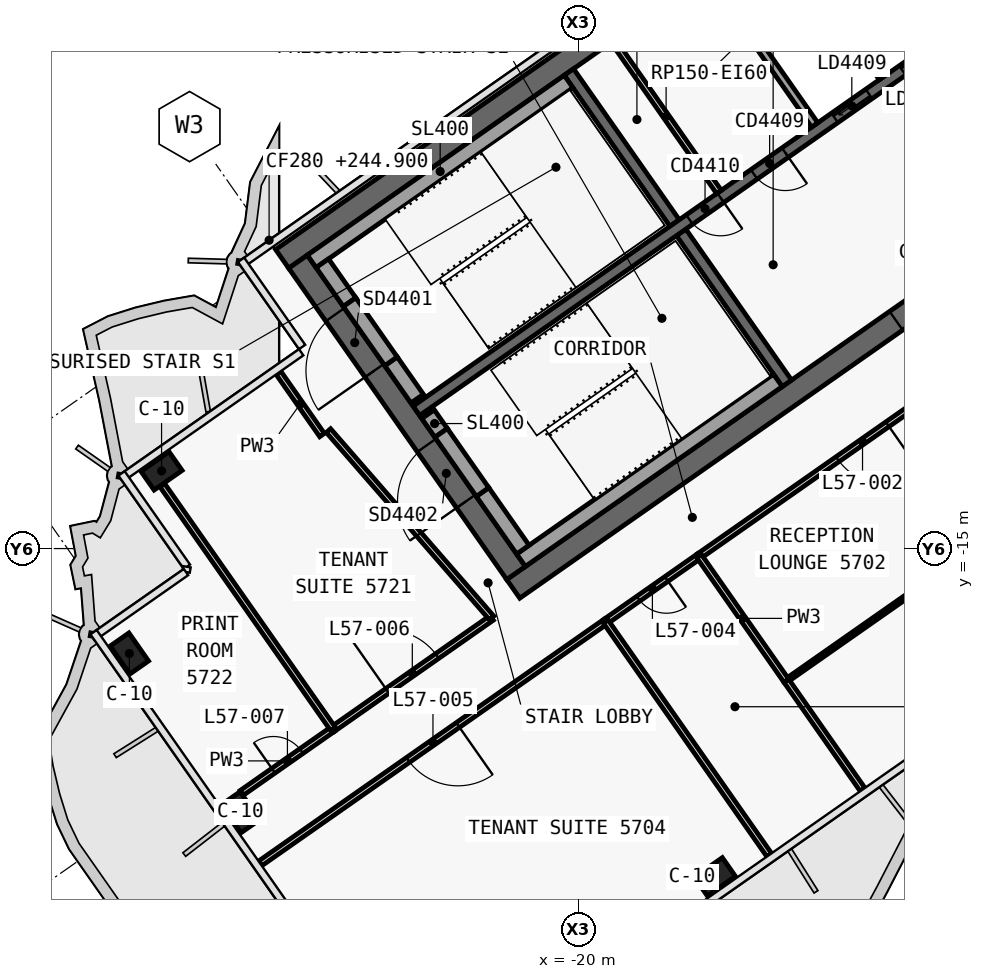
"""IFC4 building model, lengths in metres.
Left out: names, types, materials, properties, quantities, classifications, styles, units other than length and angle.
Written with IfcOpenShell. Run it as: python <this file> out.ifc"""

import sys

from ifc_helpers import new_model, si_unit, direction, frame, frame_2d, origin, origin_2d, place, context, subcontext, project, spatial, polyline, rectangle, outline, extrude, element, fill, save


model = new_model("IFC4")
c1 = context("Model", 3, precision=1e-05, world=origin(), true_north=direction((0.0, 1.0)))
c2 = subcontext(c1, "Body", "Model", "MODEL_VIEW")
j1 = project(units=[si_unit("LENGTHUNIT", "METRE"), si_unit("PLANEANGLEUNIT", "RADIAN")], contexts=[c1])
p1 = place(None, origin())
s1 = spatial("IfcSite", under=j1, at=p1, CompositionType="ELEMENT")
p2 = place(p1, origin())
s2 = spatial("IfcBuilding", under=s1, at=p2, CompositionType="ELEMENT")
p3 = place(p2, frame((0.0, 0.0, 244.9)))
s3 = spatial("IfcBuildingStorey", under=s2, at=p3, CompositionType="ELEMENT", Elevation=244.9)
p4 = place(p3, frame((-0.028, 12.066, 0.0), z_axis=(0.0, 0.0, 1.0), x_axis=(-0.819151382952, -0.573577380837, 0.0)))
e1 = element("IfcWall", 1, at=p4, inside=s3, PredefinedType="SHEAR", context=c2, shape_type="SweptSolid", body=[
    extrude(outline(polyline([(33.898, 0.3), (0.42, 0.3), (0.0, -0.3), (33.898, -0.3), (33.898, 0.3)])), origin(), (0.0, 0.0, 1.0), 3.9),
])
p5 = place(p3, frame((-0.028, -0.874, 0.0), z_axis=(0.0, 0.0, 1.0), x_axis=(-0.819150035022, -0.573579305871, 0.0)))
e2 = element("IfcWall", 2, at=p5, inside=s3, PredefinedType="SHEAR", context=c2, shape_type="SweptSolid", body=[
    extrude(outline(polyline([(26.476, 0.3), (0.42, 0.3), (0.0, -0.3), (26.476, -0.3), (26.476, 0.3)])), origin(), (0.0, 0.0, 1.0), 3.9),
])
p6 = place(p5, frame((2.976, 0.0, 0.0)))
e3 = element("IfcOpeningElement", 3, at=p6, cuts=e2, PredefinedType="OPENING", context=c2, shape_type="SweptSolid", body=[
    extrude(rectangle(XDim=2.4, YDim=2.1, at=frame_2d((1.2, 1.05))), frame((0.0, 0.31, 0.0), z_axis=(0.0, -1.0, 0.0), x_axis=(1.0, 0.0, 0.0)), (0.0, 0.0, 1.0), 0.62),
])
p7 = place(p5, frame((11.776, 0.0, 0.0)))
e4 = element("IfcOpeningElement", 4, at=p7, cuts=e2, PredefinedType="OPENING", context=c2, shape_type="SweptSolid", body=[
    extrude(rectangle(XDim=2.4, YDim=2.1, at=frame_2d((1.2, 1.05))), frame((0.0, 0.31, 0.0), z_axis=(0.0, -1.0, 0.0), x_axis=(1.0, 0.0, 0.0)), (0.0, 0.0, 1.0), 0.62),
])
p8 = place(p3, frame((-21.642, -15.642, 0.0), z_axis=(0.0, 0.0, 1.0), x_axis=(-0.573586866468, 0.819144740944, 0.0)))
e5 = element("IfcWall", 5, at=p8, inside=s3, PredefinedType="SHEAR", context=c2, shape_type="SweptSolid", body=[
    extrude(outline(polyline([(0.0, 0.3), (0.0, -0.3), (10.0, -0.3), (10.0, 0.3), (0.0, 0.3)])), origin(), (0.0, 0.0, 1.0), 3.9),
])
p9 = place(p8, frame((6.5, 0.0, 0.0)))
e6 = element("IfcOpeningElement", 6, at=p9, cuts=e5, PredefinedType="OPENING", context=c2, shape_type="SweptSolid", body=[
    extrude(rectangle(XDim=1.8, YDim=2.1, at=frame_2d((0.9, 1.05))), frame((0.0, 0.31, 0.0), z_axis=(0.0, -1.0, 0.0), x_axis=(1.0, 0.0, 0.0)), (0.0, 0.0, 1.0), 0.62),
])
p10 = place(p8, frame((2.3, 0.0, 0.0)))
e7 = element("IfcOpeningElement", 7, at=p10, cuts=e5, PredefinedType="OPENING", context=c2, shape_type="SweptSolid", body=[
    extrude(rectangle(XDim=1.8, YDim=2.1, at=frame_2d((0.9, 1.05))), frame((0.0, 0.31, 0.0), z_axis=(0.0, -1.0, 0.0), x_axis=(1.0, 0.0, 0.0)), (0.0, 0.0, 1.0), 0.62),
])
p11 = place(p3, frame((-14.515, -10.652, 0.0), z_axis=(0.0, 0.0, 1.0), x_axis=(-0.573560315113, 0.819163332265, 0.0)))
e8 = element("IfcWall", 8, at=p11, inside=s3, PredefinedType="SHEAR", context=c2, shape_type="SweptSolid", body=[
    extrude(outline(polyline([(4.85, 0.15), (0.0, 0.15), (0.0, -0.15), (4.85, -0.15), (4.85, 0.15)])), origin(), (0.0, 0.0, 1.0), 3.9),
])
p12 = place(p3, frame((-17.469, -6.433, 0.0), z_axis=(0.0, 0.0, 1.0), x_axis=(-0.573594092424, 0.81913968109, 0.0)))
e9 = element("IfcWall", 9, at=p12, inside=s3, PredefinedType="SHEAR", context=c2, shape_type="SweptSolid", body=[
    extrude(outline(polyline([(4.85, -0.15), (4.85, 0.15), (0.0, 0.15), (0.0, -0.15), (4.85, -0.15)])), origin(), (0.0, 0.0, 1.0), 3.9),
])
p13 = place(p3, frame((-2.638, 3.768, 0.0), z_axis=(0.0, 0.0, 1.0), x_axis=(-0.819155014212, -0.573572194837, 0.0)))
e10 = element("IfcWall", 10, at=p13, inside=s3, PredefinedType="SHEAR", context=c2, shape_type="SweptSolid", body=[
    extrude(outline(polyline([(26.4, 0.15), (0.0, 0.15), (0.0, -0.15), (26.4, -0.15), (26.4, 0.15)])), origin(), (0.0, 0.0, 1.0), 3.9),
])
p14 = place(p13, frame((1.169, 0.0, 0.0)))
e11 = element("IfcOpeningElement", 11, at=p14, cuts=e10, PredefinedType="OPENING", context=c2, shape_type="SweptSolid", body=[
    extrude(rectangle(XDim=1.1, YDim=2.1, at=frame_2d((0.55, 1.05))), frame((0.0, 0.16, 0.0), z_axis=(0.0, -1.0, 0.0), x_axis=(1.0, 0.0, 0.0)), (0.0, 0.0, 1.0), 0.32),
])
p15 = place(p13, frame((3.206, 0.0, 0.0)))
e12 = element("IfcOpeningElement", 12, at=p15, cuts=e10, PredefinedType="OPENING", context=c2, shape_type="SweptSolid", body=[
    extrude(rectangle(XDim=1.1, YDim=2.1, at=frame_2d((0.55, 1.05))), frame((0.0, 0.16, 0.0), z_axis=(0.0, -1.0, 0.0), x_axis=(1.0, 0.0, 0.0)), (0.0, 0.0, 1.0), 0.32),
])
p16 = place(p13, frame((5.244, 0.0, 0.0)))
e13 = element("IfcOpeningElement", 13, at=p16, cuts=e10, PredefinedType="OPENING", context=c2, shape_type="SweptSolid", body=[
    extrude(rectangle(XDim=1.1, YDim=2.1, at=frame_2d((0.55, 1.05))), frame((0.0, 0.16, 0.0), z_axis=(0.0, -1.0, 0.0), x_axis=(1.0, 0.0, 0.0)), (0.0, 0.0, 1.0), 0.32),
])
p17 = place(p13, frame((7.281, 0.0, 0.0)))
e14 = element("IfcOpeningElement", 14, at=p17, cuts=e10, PredefinedType="OPENING", context=c2, shape_type="SweptSolid", body=[
    extrude(rectangle(XDim=1.1, YDim=2.1, at=frame_2d((0.55, 1.05))), frame((0.0, 0.16, 0.0), z_axis=(0.0, -1.0, 0.0), x_axis=(1.0, 0.0, 0.0)), (0.0, 0.0, 1.0), 0.32),
])
p18 = place(p13, frame((9.688, 0.0, 0.0)))
e15 = element("IfcOpeningElement", 15, at=p18, cuts=e10, PredefinedType="OPENING", context=c2, shape_type="SweptSolid", body=[
    extrude(rectangle(XDim=1.1, YDim=2.1, at=frame_2d((0.55, 1.05))), frame((0.0, 0.16, 0.0), z_axis=(0.0, -1.0, 0.0), x_axis=(1.0, 0.0, 0.0)), (0.0, 0.0, 1.0), 0.32),
])
p19 = place(p13, frame((11.863, 0.0, 0.0)))
e16 = element("IfcOpeningElement", 16, at=p19, cuts=e10, PredefinedType="OPENING", context=c2, shape_type="SweptSolid", body=[
    extrude(rectangle(XDim=1.1, YDim=2.1, at=frame_2d((0.55, 1.05))), frame((0.0, 0.16, 0.0), z_axis=(0.0, -1.0, 0.0), x_axis=(1.0, 0.0, 0.0)), (0.0, 0.0, 1.0), 0.32),
])
p20 = place(p13, frame((14.552, 0.0, 0.0)))
e17 = element("IfcOpeningElement", 17, at=p20, cuts=e10, PredefinedType="OPENING", context=c2, shape_type="SweptSolid", body=[
    extrude(rectangle(XDim=1.0, YDim=2.1, at=frame_2d((0.5, 1.05))), frame((0.0, 0.16, 0.0), z_axis=(0.0, -1.0, 0.0), x_axis=(1.0, 0.0, 0.0)), (0.0, 0.0, 1.0), 0.32),
])
p21 = place(p13, frame((16.627, 0.0, 0.0)))
e18 = element("IfcOpeningElement", 18, at=p21, cuts=e10, PredefinedType="OPENING", context=c2, shape_type="SweptSolid", body=[
    extrude(rectangle(XDim=1.0, YDim=2.1, at=frame_2d((0.5, 1.05))), frame((0.0, 0.16, 0.0), z_axis=(0.0, -1.0, 0.0), x_axis=(1.0, 0.0, 0.0)), (0.0, 0.0, 1.0), 0.32),
])
for number, where, z_axis, x_axis in (
    (19, (-16.41, -23.637, 0.0), (0.0, 0.0, 1.0), (-0.819, -0.574, 0.0)),
    (20, (-30.969, -12.956, 0.0), (0.0, 0.0, 1.0), (-0.819, -0.574, 0.0)),
    (21, (-28.891, -21.939, 0.0), (0.0, 0.0, 1.0), (-0.574, 0.819, 0.0)),
    (22, (-31.816, -17.761, 0.0), (0.0, 0.0, 1.0), (-0.574, 0.819, 0.0)),
):
    element("IfcColumn", number, at=place(p3, frame(where, z_axis=z_axis, x_axis=x_axis)), inside=s3, PredefinedType="COLUMN", context=c2, shape_type="SweptSolid", body=[
        extrude(rectangle(XDim=0.9, YDim=0.6, at=origin_2d()), origin(), (0.0, 0.0, 1.0), 3.9),
    ])
p22 = place(p3, frame((-16.302, -5.616, 0.0), z_axis=(0.0, 0.0, 1.0), x_axis=(-0.573560315113, 0.819163332265, 0.0)))
e23 = element("IfcWall", 23, at=p22, inside=s3, PredefinedType="PARTITIONING", context=c2, shape_type="SweptSolid", body=[
    extrude(rectangle(XDim=4.85, YDim=0.15, at=frame_2d((2.425, 0.0))), origin(), (0.0, 0.0, 1.0), 3.62),
])
p23 = place(p3, frame((-12.001, -2.605, 0.0), z_axis=(0.0, 0.0, 1.0), x_axis=(-0.573560315113, 0.819163332265, 0.0)))
e24 = element("IfcWall", 24, at=p23, inside=s3, PredefinedType="SOLIDWALL", context=c2, shape_type="SweptSolid", body=[
    extrude(rectangle(XDim=4.85, YDim=0.2, at=frame_2d((2.425, 0.0))), origin(), (0.0, 0.0, 1.0), 3.9),
])
p24 = place(p3, frame((-13.783, -3.852, 0.0), z_axis=(0.0, 0.0, 1.0), x_axis=(-0.573594092424, 0.81913968109, 0.0)))
e25 = element("IfcWall", 25, at=p24, inside=s3, PredefinedType="SOLIDWALL", context=c2, shape_type="SweptSolid", body=[
    extrude(rectangle(XDim=4.85, YDim=0.2, at=frame_2d((2.425, 0.0))), origin(), (0.0, 0.0, 1.0), 3.9),
])
p25 = place(p3, frame((-20.259, -2.71, 0.0), z_axis=(0.0, 0.0, 1.0), x_axis=(-0.81914849389, -0.573581506813, 0.0)))
e26 = element("IfcWall", 26, at=p25, inside=s3, PredefinedType="SOLIDWALL", context=c2, shape_type="SweptSolid", body=[
    extrude(rectangle(XDim=8.25, YDim=0.4, at=frame_2d((4.125, 0.0))), origin(), (0.0, 0.0, 1.0), 3.62),
])
p26 = place(p3, frame((-24.244, -11.055, 0.0), z_axis=(0.0, 0.0, 1.0), x_axis=(-0.573571582932, 0.819155442668, 0.0)))
e27 = element("IfcWall", 27, at=p26, inside=s3, PredefinedType="SOLIDWALL", context=c2, shape_type="SweptSolid", body=[
    extrude(rectangle(XDim=1.2, YDim=0.4, at=frame_2d((0.6, 0.0))), origin(), (0.0, 0.0, 1.0), 3.62),
])
p27 = place(p3, frame((-26.022, -8.515, 0.0), z_axis=(0.0, 0.0, 1.0), x_axis=(-0.573619628835, 0.819121798889, 0.0)))
e28 = element("IfcWall", 28, at=p27, inside=s3, PredefinedType="SOLIDWALL", context=c2, shape_type="SweptSolid", body=[
    extrude(rectangle(XDim=1.25, YDim=0.4, at=frame_2d((0.625, 0.0))), origin(), (0.0, 0.0, 1.0), 3.62),
])
p28 = place(p3, frame((-24.932, -10.072, 2.15), z_axis=(0.0, 0.0, 1.0), x_axis=(-0.573591692345, 0.819141361715, 0.0)))
e29 = element("IfcWall", 29, at=p28, inside=s3, PredefinedType="SOLIDWALL", context=c2, shape_type="SweptSolid", body=[
    extrude(rectangle(XDim=1.9, YDim=0.4, at=frame_2d((0.95, 0.0))), origin(), (0.0, 0.0, 1.0), 1.47),
])
p29 = place(p3, frame((-14.753, -10.574, 0.0), z_axis=(0.0, 0.0, 1.0), x_axis=(-0.819158229677, -0.573567602601, 0.0)))
e30 = element("IfcWall", 30, at=p29, inside=s3, PredefinedType="SOLIDWALL", context=c2, shape_type="SweptSolid", body=[
    extrude(rectangle(XDim=8.25, YDim=0.4, at=frame_2d((4.125, 0.0))), origin(), (0.0, 0.0, 1.0), 3.62),
])
p30 = place(p3, frame((-21.462, -15.028, 0.0), z_axis=(0.0, 0.0, 1.0), x_axis=(-0.573559770908, 0.819163713305, 0.0)))
e31 = element("IfcWall", 31, at=p30, inside=s3, PredefinedType="SOLIDWALL", context=c2, shape_type="SweptSolid", body=[
    extrude(rectangle(XDim=1.85, YDim=0.4, at=frame_2d((0.925, 0.0))), origin(), (0.0, 0.0, 1.0), 3.62),
])
p31 = place(p3, frame((-23.613, -11.956, 0.0), z_axis=(0.0, 0.0, 1.0), x_axis=(-0.573435029941, 0.819251039936, 0.0)))
e32 = element("IfcWall", 32, at=p31, inside=s3, PredefinedType="SOLIDWALL", context=c2, shape_type="SweptSolid", body=[
    extrude(rectangle(XDim=0.6, YDim=0.4, at=frame_2d((0.3, 0.0))), origin(), (0.0, 0.0, 1.0), 3.62),
])
p32 = place(p3, frame((-22.523, -13.512, 2.15), z_axis=(0.0, 0.0, 1.0), x_axis=(-0.573591692345, 0.819141361715, 0.0)))
e33 = element("IfcWall", 33, at=p32, inside=s3, PredefinedType="SOLIDWALL", context=c2, shape_type="SweptSolid", body=[
    extrude(rectangle(XDim=1.9, YDim=0.4, at=frame_2d((0.95, 0.0))), origin(), (0.0, 0.0, 1.0), 1.47),
])
p33 = place(p3, frame((-26.459, -19.749, 0.0), z_axis=(0.0, 0.0, 1.0), x_axis=(0.819139678325, 0.573594096373, 0.0)))
e34 = element("IfcWall", 34, at=p33, inside=s3, PredefinedType="PARTITIONING", context=c2, shape_type="SweptSolid", body=[
    extrude(rectangle(XDim=5.099, YDim=0.15, at=frame_2d((2.549, 0.0))), origin(), (0.0, 0.0, 1.0), 3.05),
])
p34 = place(p33, frame((1.749, 0.0, 0.0)))
e35 = element("IfcOpeningElement", 35, at=p34, cuts=e34, PredefinedType="OPENING", context=c2, shape_type="SweptSolid", body=[
    extrude(rectangle(XDim=1.6, YDim=2.1, at=frame_2d((0.8, 1.05))), frame((0.0, 0.085, 0.0), z_axis=(0.0, -1.0, 0.0), x_axis=(1.0, 0.0, 0.0)), (0.0, 0.0, 1.0), 0.17),
])
p35 = place(p3, frame((-28.858, -21.428, 0.0), z_axis=(0.0, 0.0, 1.0), x_axis=(0.819149757547, 0.573579702143, 0.0)))
e36 = element("IfcWall", 36, at=p35, inside=s3, PredefinedType="PARTITIONING", context=c2, shape_type="SweptSolid", body=[
    extrude(rectangle(XDim=2.932, YDim=0.15, at=frame_2d((1.466, 0.0))), origin(), (0.0, 0.0, 1.0), 3.05),
])
p36 = place(p35, frame((1.016, 0.0, 0.0)))
e37 = element("IfcOpeningElement", 37, at=p36, cuts=e36, PredefinedType="OPENING", context=c2, shape_type="SweptSolid", body=[
    extrude(rectangle(XDim=0.9, YDim=2.1, at=frame_2d((0.45, 1.05))), frame((0.0, 0.085, 0.0), z_axis=(0.0, -1.0, 0.0), x_axis=(1.0, 0.0, 0.0)), (0.0, 0.0, 1.0), 0.17),
])
p37 = place(p3, frame((-8.222, -9.175, 0.0), z_axis=(0.0, 0.0, 1.0), x_axis=(-0.81915329441, -0.573574650989, 0.0)))
e38 = element("IfcWall", 38, at=p37, inside=s3, PredefinedType="PARTITIONING", context=c2, shape_type="SweptSolid", body=[
    extrude(rectangle(XDim=10.504, YDim=0.15, at=frame_2d((5.252, 0.0))), origin(), (0.0, 0.0, 1.0), 3.05),
])
p38 = place(p37, frame((4.452, 0.0, 0.0)))
e39 = element("IfcOpeningElement", 39, at=p38, cuts=e38, PredefinedType="OPENING", context=c2, shape_type="SweptSolid", body=[
    extrude(rectangle(XDim=1.6, YDim=2.1, at=frame_2d((0.8, 1.05))), frame((0.0, 0.085, 0.0), z_axis=(0.0, -1.0, 0.0), x_axis=(1.0, 0.0, 0.0)), (0.0, 0.0, 1.0), 0.17),
])
p39 = place(p3, frame((-16.823, -15.198, 0.0), z_axis=(0.0, 0.0, 1.0), x_axis=(-0.81916700466, -0.573555070134, 0.0)))
e40 = element("IfcWall", 40, at=p39, inside=s3, PredefinedType="PARTITIONING", context=c2, shape_type="SweptSolid", body=[
    extrude(rectangle(XDim=3.004, YDim=0.15, at=frame_2d((1.502, 0.0))), origin(), (0.0, 0.0, 1.0), 3.62),
])
p40 = place(p39, frame((1.052, 0.0, 0.0)))
e41 = element("IfcOpeningElement", 41, at=p40, cuts=e40, PredefinedType="OPENING", context=c2, shape_type="SweptSolid", body=[
    extrude(rectangle(XDim=0.9, YDim=2.1, at=frame_2d((0.45, 1.05))), frame((0.0, 0.085, 0.0), z_axis=(0.0, -1.0, 0.0), x_axis=(1.0, 0.0, 0.0)), (0.0, 0.0, 1.0), 0.17),
])
p41 = place(p3, frame((-19.281, -16.919, 0.0), z_axis=(0.0, 0.0, 1.0), x_axis=(-0.819149262835, -0.573580408658, 0.0)))
e42 = element("IfcWall", 42, at=p41, inside=s3, PredefinedType="PARTITIONING", context=c2, shape_type="SweptSolid", body=[
    extrude(rectangle(XDim=11.102, YDim=0.15, at=frame_2d((5.551, 0.0))), origin(), (0.0, 0.0, 1.0), 3.0),
])
p42 = place(p41, frame((4.751, 0.0, 0.0)))
e43 = element("IfcOpeningElement", 43, at=p42, cuts=e42, PredefinedType="OPENING", context=c2, shape_type="SweptSolid", body=[
    extrude(rectangle(XDim=1.6, YDim=2.1, at=frame_2d((0.8, 1.05))), frame((0.0, 0.085, 0.0), z_axis=(0.0, -1.0, 0.0), x_axis=(1.0, 0.0, 0.0)), (0.0, 0.0, 1.0), 0.17),
])
p43 = place(p3, frame((-26.746, -12.014, 0.0), z_axis=(0.0, 0.0, 1.0), x_axis=(-0.573568836472, 0.819157365729, 0.0)))
e44 = element("IfcWall", 44, at=p43, inside=s3, PredefinedType="PARTITIONING", context=c2, shape_type="SweptSolid", body=[
    extrude(rectangle(XDim=2.0, YDim=0.15, at=frame_2d((1.0, 0.0))), origin(), (0.0, 0.0, 1.0), 3.05),
])
p44 = place(p3, frame((-22.284, -16.826, 0.0), z_axis=(0.0, 0.0, 1.0), x_axis=(-0.656758142177, 0.754101281449, 0.0)))
e45 = element("IfcWall", 45, at=p44, inside=s3, PredefinedType="PARTITIONING", context=c2, shape_type="SweptSolid", body=[
    extrude(rectangle(XDim=6.539, YDim=0.15, at=frame_2d((3.269, 0.0))), origin(), (0.0, 0.0, 1.0), 3.62),
])
p45 = place(p3, frame((-26.458, -19.747, 0.0), z_axis=(0.0, 0.0, 1.0), x_axis=(-0.573558601227, 0.819164532288, 0.0)))
e46 = element("IfcWall", 46, at=p45, inside=s3, PredefinedType="PARTITIONING", context=c2, shape_type="SweptSolid", body=[
    extrude(rectangle(XDim=7.83, YDim=0.15, at=frame_2d((3.915, 0.0))), origin(), (0.0, 0.0, 1.0), 3.0),
])
p46 = place(p3, frame((-5.929, -12.454, 0.0), z_axis=(0.0, 0.0, 1.0), x_axis=(-0.819155448096, -0.573571575181, 0.0)))
e47 = element("IfcWall", 47, at=p46, inside=s3, PredefinedType="PARTITIONING", context=c2, shape_type="SweptSolid", body=[
    extrude(rectangle(XDim=10.5, YDim=0.1, at=frame_2d((5.25, 0.0))), origin(), (0.0, 0.0, 1.0), 3.05),
])
p47 = place(p46, frame((4.8, 0.0, 0.0)))
e48 = element("IfcOpeningElement", 48, at=p47, cuts=e47, PredefinedType="OPENING", context=c2, shape_type="SweptSolid", body=[
    extrude(rectangle(XDim=0.9, YDim=2.1, at=frame_2d((0.45, 1.05))), frame((0.0, 0.06, 0.0), z_axis=(0.0, -1.0, 0.0), x_axis=(1.0, 0.0, 0.0)), (0.0, 0.0, 1.0), 0.12),
])
p48 = place(p3, frame((-12.523, -21.343, 0.0), z_axis=(0.0, 0.0, 1.0), x_axis=(-0.573555999232, 0.819166354134, 0.0)))
e49 = element("IfcWall", 49, at=p48, inside=s3, PredefinedType="PARTITIONING", context=c2, shape_type="SweptSolid", body=[
    extrude(rectangle(XDim=3.499, YDim=0.15, at=frame_2d((1.75, 0.0))), origin(), (0.0, 0.0, 1.0), 3.0),
])
p49 = place(p3, frame((-14.531, -18.476, 0.0), z_axis=(0.0, 0.0, 1.0), x_axis=(-0.573626190743, 0.819117203636, 0.0)))
e50 = element("IfcWall", 50, at=p49, inside=s3, PredefinedType="PARTITIONING", context=c2, shape_type="SweptSolid", body=[
    extrude(rectangle(XDim=4.0, YDim=0.15, at=frame_2d((2.0, 0.0))), origin(), (0.0, 0.0, 1.0), 3.62),
])
p50 = place(p3, frame((-14.98, -23.063, 0.0), z_axis=(0.0, 0.0, 1.0), x_axis=(-0.573597787563, 0.819137093595, 0.0)))
e51 = element("IfcWall", 51, at=p50, inside=s3, PredefinedType="PARTITIONING", context=c2, shape_type="SweptSolid", body=[
    extrude(rectangle(XDim=7.5, YDim=0.15, at=frame_2d((3.75, 0.0))), origin(), (0.0, 0.0, 1.0), 3.0),
])
p51 = place(p18, origin())
e52 = element("IfcDoor", 52, at=p51, inside=s3, OperationType="SLIDING_TO_LEFT", PredefinedType="DOOR", context=c2, shape_type="SweptSolid", body=[
    extrude(rectangle(XDim=1.1, YDim=2.1, at=frame_2d((0.55, 1.05))), frame((0.0, 0.025, 0.0), z_axis=(0.0, -1.0, 0.0), x_axis=(1.0, 0.0, 0.0)), (0.0, 0.0, 1.0), 0.05),
])
fill(e15, e52)
p52 = place(p19, origin())
e53 = element("IfcDoor", 53, at=p52, inside=s3, OperationType="SLIDING_TO_RIGHT", PredefinedType="DOOR", context=c2, shape_type="SweptSolid", body=[
    extrude(rectangle(XDim=1.1, YDim=2.1, at=frame_2d((0.55, 1.05))), frame((0.0, 0.025, 0.0), z_axis=(0.0, -1.0, 0.0), x_axis=(1.0, 0.0, 0.0)), (0.0, 0.0, 1.0), 0.05),
])
fill(e16, e53)
p53 = place(p20, origin())
e54 = element("IfcDoor", 54, at=p53, inside=s3, OperationType="SINGLE_SWING_RIGHT", PredefinedType="DOOR", context=c2, shape_type="SweptSolid", body=[
    extrude(rectangle(XDim=1.0, YDim=2.1, at=frame_2d((0.5, 1.05))), frame((0.0, 0.025, 0.0), z_axis=(0.0, -1.0, 0.0), x_axis=(1.0, 0.0, 0.0)), (0.0, 0.0, 1.0), 0.05),
])
fill(e17, e54)
p54 = place(p21, origin())
e55 = element("IfcDoor", 55, at=p54, inside=s3, OperationType="SINGLE_SWING_RIGHT", PredefinedType="DOOR", context=c2, shape_type="SweptSolid", body=[
    extrude(rectangle(XDim=1.0, YDim=2.1, at=frame_2d((0.5, 1.05))), frame((0.0, 0.025, 0.0), z_axis=(0.0, -1.0, 0.0), x_axis=(1.0, 0.0, 0.0)), (0.0, 0.0, 1.0), 0.05),
])
fill(e18, e55)
p55 = place(p7, origin())
e56 = element("IfcDoor", 56, at=p55, inside=s3, OperationType="DOUBLE_DOOR_SINGLE_SWING", PredefinedType="DOOR", context=c2, shape_type="SweptSolid", body=[
    extrude(rectangle(XDim=2.4, YDim=2.1, at=frame_2d((1.2, 1.05))), frame((0.0, 0.025, 0.0), z_axis=(0.0, -1.0, 0.0), x_axis=(1.0, 0.0, 0.0)), (0.0, 0.0, 1.0), 0.05),
])
fill(e4, e56)
p56 = place(p9, origin())
e57 = element("IfcDoor", 57, at=p56, inside=s3, OperationType="DOUBLE_DOOR_SINGLE_SWING", PredefinedType="DOOR", context=c2, shape_type="SweptSolid", body=[
    extrude(rectangle(XDim=1.8, YDim=2.1, at=frame_2d((0.9, 1.05))), frame((0.0, 0.025, 0.0), z_axis=(0.0, -1.0, 0.0), x_axis=(1.0, 0.0, 0.0)), (0.0, 0.0, 1.0), 0.05),
])
fill(e6, e57)
p57 = place(p10, origin())
e58 = element("IfcDoor", 58, at=p57, inside=s3, OperationType="DOUBLE_DOOR_SINGLE_SWING", PredefinedType="DOOR", context=c2, shape_type="SweptSolid", body=[
    extrude(rectangle(XDim=1.8, YDim=2.1, at=frame_2d((0.9, 1.05))), frame((0.0, 0.025, 0.0), z_axis=(0.0, -1.0, 0.0), x_axis=(1.0, 0.0, 0.0)), (0.0, 0.0, 1.0), 0.05),
])
fill(e7, e58)
p58 = place(p38, origin())
e59 = element("IfcDoor", 59, at=p58, inside=s3, OperationType="DOUBLE_DOOR_SINGLE_SWING", PredefinedType="DOOR", context=c2, shape_type="SweptSolid", body=[
    extrude(rectangle(XDim=1.6, YDim=2.1, at=frame_2d((0.8, 1.05))), frame((0.0, 0.025, 0.0), z_axis=(0.0, -1.0, 0.0), x_axis=(1.0, 0.0, 0.0)), (0.0, 0.0, 1.0), 0.05),
])
fill(e39, e59)
p59 = place(p40, origin())
e60 = element("IfcDoor", 60, at=p59, inside=s3, OperationType="SINGLE_SWING_LEFT", PredefinedType="DOOR", context=c2, shape_type="SweptSolid", body=[
    extrude(rectangle(XDim=0.9, YDim=2.1, at=frame_2d((0.45, 1.05))), frame((0.0, 0.025, 0.0), z_axis=(0.0, -1.0, 0.0), x_axis=(1.0, 0.0, 0.0)), (0.0, 0.0, 1.0), 0.05),
])
fill(e41, e60)
p60 = place(p42, origin())
e61 = element("IfcDoor", 61, at=p60, inside=s3, OperationType="DOUBLE_DOOR_SINGLE_SWING", PredefinedType="DOOR", context=c2, shape_type="SweptSolid", body=[
    extrude(rectangle(XDim=1.6, YDim=2.1, at=frame_2d((0.8, 1.05))), frame((0.0, 0.025, 0.0), z_axis=(0.0, -1.0, 0.0), x_axis=(1.0, 0.0, 0.0)), (0.0, 0.0, 1.0), 0.05),
])
fill(e43, e61)
p61 = place(p34, origin())
e62 = element("IfcDoor", 62, at=p61, inside=s3, OperationType="DOUBLE_DOOR_SINGLE_SWING", PredefinedType="DOOR", context=c2, shape_type="SweptSolid", body=[
    extrude(rectangle(XDim=1.6, YDim=2.1, at=frame_2d((0.8, 1.05))), frame((0.0, 0.025, 0.0), z_axis=(0.0, -1.0, 0.0), x_axis=(1.0, 0.0, 0.0)), (0.0, 0.0, 1.0), 0.05),
])
fill(e35, e62)
p62 = place(p36, origin())
e63 = element("IfcDoor", 63, at=p62, inside=s3, OperationType="SINGLE_SWING_RIGHT", PredefinedType="DOOR", context=c2, shape_type="SweptSolid", body=[
    extrude(rectangle(XDim=0.9, YDim=2.1, at=frame_2d((0.45, 1.05))), frame((0.0, 0.025, 0.0), z_axis=(0.0, -1.0, 0.0), x_axis=(1.0, 0.0, 0.0)), (0.0, 0.0, 1.0), 0.05),
])
fill(e37, e63)
save(model, sys.argv[1])
